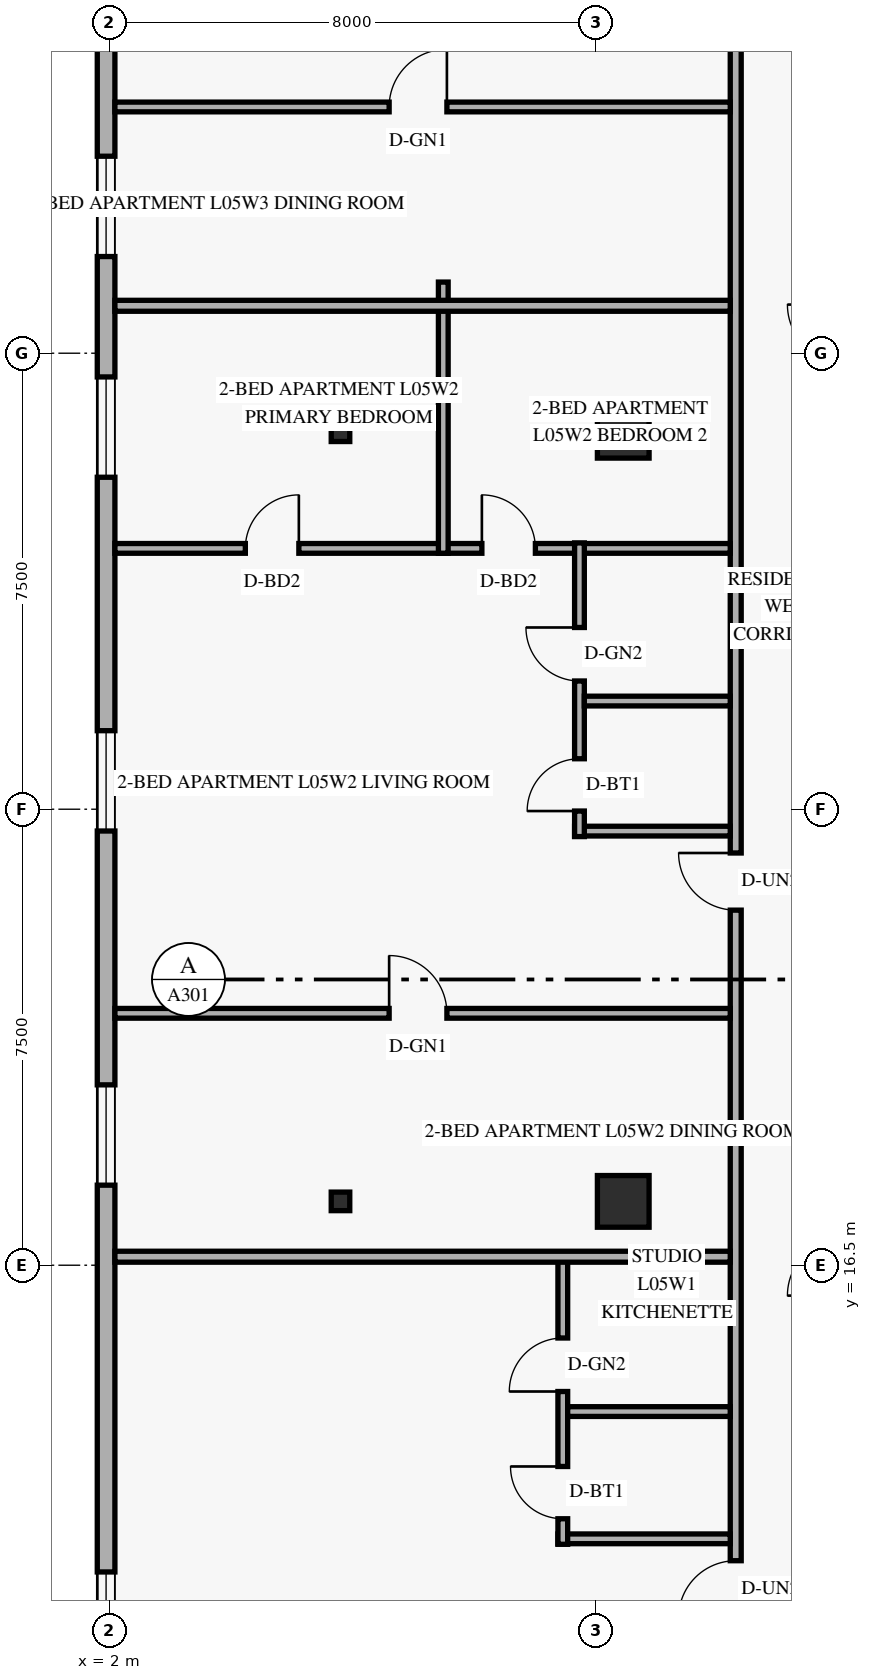
"""IFC4 building model, lengths in metres.
Left out: names, types, materials, properties, quantities, classifications, styles, units other than length and angle.
Written with IfcOpenShell. Run it as: python <this file> out.ifc"""

import sys

from ifc_helpers import new_model, si_unit, direction, frame, frame_2d, origin, origin_2d, place, context, subcontext, project, spatial, rectangle, hollow_rectangle, extrude, element, fill, save


model = new_model("IFC4")
c1 = context("Model", 3, precision=1e-05, world=origin(), true_north=direction((0.0, 1.0)))
c2 = subcontext(c1, "Body", "Model", "MODEL_VIEW")
j1 = project(units=[si_unit("LENGTHUNIT", "METRE"), si_unit("PLANEANGLEUNIT", "RADIAN")], contexts=[c1])
p1 = place(None, origin())
s1 = spatial("IfcSite", under=j1, at=p1, CompositionType="ELEMENT")
p2 = place(p1, origin())
s2 = spatial("IfcBuilding", under=s1, at=p2, CompositionType="ELEMENT")
p3 = place(p2, frame((0.0, 0.0, 24.0)))
s3 = spatial("IfcBuildingStorey", under=s2, at=p3, CompositionType="ELEMENT", Elevation=24.0)
for number, where, z_axis, x_axis in (
    (1, (5.8, 17.55, -0.3), (0.0, 0.0, 1.0), (1.0, 0.0, 0.0)),
    (2, (5.8, 30.2, -0.3), (0.0, 0.0, 1.0), (1.0, 0.0, 0.0)),
):
    element("IfcColumn", number, at=place(p3, frame(where, z_axis=z_axis, x_axis=x_axis)), inside=s3, PredefinedType="COLUMN", context=c2, shape_type="SweptSolid", body=[
        extrude(hollow_rectangle(XDim=0.305, YDim=0.305, WallThickness=0.013, at=origin_2d()), origin(), (0.0, 0.0, 1.0), 3.9),
    ])
for number, where, z_axis, x_axis in (
    (3, (10.45, 17.55, 0.0), (0.0, 0.0, 1.0), (1.0, 0.0, 0.0)),
    (4, (10.45, 30.2, 0.0), (0.0, 0.0, 1.0), (1.0, 0.0, 0.0)),
):
    element("IfcColumn", number, at=place(p3, frame(where, z_axis=z_axis, x_axis=x_axis)), inside=s3, PredefinedType="COLUMN", context=c2, shape_type="SweptSolid", body=[
        extrude(rectangle(XDim=0.85, YDim=0.85, at=origin_2d()), origin(), (0.0, 0.0, 1.0), 3.6),
    ])
p4 = place(p3, frame((1.945, 43.38, 0.0), z_axis=(0.0, 0.0, 1.0), x_axis=(0.0, -1.0, 0.0)))
e5 = element("IfcWall", 5, at=p4, inside=s3, PredefinedType="SOLIDWALL", context=c2, shape_type="SweptSolid", body=[
    extrude(rectangle(XDim=38.76, YDim=0.29, at=frame_2d((19.38, 0.0))), origin(), (0.0, 0.0, 1.0), 3.36),
])
p5 = place(p4, frame((31.925, 0.0, 0.85)))
e6 = element("IfcOpeningElement", 6, at=p5, cuts=e5, PredefinedType="OPENING", context=c2, shape_type="SweptSolid", body=[
    extrude(rectangle(XDim=1.65, YDim=1.6, at=frame_2d((0.825, 0.8))), frame((0.0, 0.155, 0.0), z_axis=(0.0, -1.0, 0.0), x_axis=(1.0, 0.0, 0.0)), (0.0, 0.0, 1.0), 0.31),
])
p6 = place(p4, frame((23.913, 0.0, 0.85)))
e7 = element("IfcOpeningElement", 7, at=p6, cuts=e5, PredefinedType="OPENING", context=c2, shape_type="SweptSolid", body=[
    extrude(rectangle(XDim=1.65, YDim=1.6, at=frame_2d((0.825, 0.8))), frame((0.0, 0.155, 0.0), z_axis=(0.0, -1.0, 0.0), x_axis=(1.0, 0.0, 0.0)), (0.0, 0.0, 1.0), 0.31),
])
p7 = place(p4, frame((18.088, 0.0, 0.85)))
e8 = element("IfcOpeningElement", 8, at=p7, cuts=e5, PredefinedType="OPENING", context=c2, shape_type="SweptSolid", body=[
    extrude(rectangle(XDim=1.65, YDim=1.6, at=frame_2d((0.825, 0.8))), frame((0.0, 0.155, 0.0), z_axis=(0.0, -1.0, 0.0), x_axis=(1.0, 0.0, 0.0)), (0.0, 0.0, 1.0), 0.31),
])
p8 = place(p4, frame((12.27, 0.0, 0.85)))
e9 = element("IfcOpeningElement", 9, at=p8, cuts=e5, PredefinedType="OPENING", context=c2, shape_type="SweptSolid", body=[
    extrude(rectangle(XDim=1.65, YDim=1.6, at=frame_2d((0.825, 0.8))), frame((0.0, 0.155, 0.0), z_axis=(0.0, -1.0, 0.0), x_axis=(1.0, 0.0, 0.0)), (0.0, 0.0, 1.0), 0.31),
])
p9 = place(p4, frame((8.64, 0.0, 0.85)))
e10 = element("IfcOpeningElement", 10, at=p9, cuts=e5, PredefinedType="OPENING", context=c2, shape_type="SweptSolid", body=[
    extrude(rectangle(XDim=1.65, YDim=1.6, at=frame_2d((0.825, 0.8))), frame((0.0, 0.155, 0.0), z_axis=(0.0, -1.0, 0.0), x_axis=(1.0, 0.0, 0.0)), (0.0, 0.0, 1.0), 0.31),
])
p10 = place(p4, frame((3.09, 0.0, 0.85)))
e11 = element("IfcOpeningElement", 11, at=p10, cuts=e5, PredefinedType="OPENING", context=c2, shape_type="SweptSolid", body=[
    extrude(rectangle(XDim=1.65, YDim=1.6, at=frame_2d((0.825, 0.8))), frame((0.0, 0.155, 0.0), z_axis=(0.0, -1.0, 0.0), x_axis=(1.0, 0.0, 0.0)), (0.0, 0.0, 1.0), 0.31),
])
p11 = place(p3, frame((12.3, 1.29, 0.0), z_axis=(0.0, 0.0, 1.0), x_axis=(0.0, 1.0, 0.0)))
e12 = element("IfcWall", 12, at=p11, inside=s3, PredefinedType="STANDARD", context=c2, shape_type="SweptSolid", body=[
    extrude(rectangle(XDim=45.42, YDim=0.18, at=frame_2d((22.71, 0.0))), origin(), (0.0, 0.0, 1.0), 2.649),
])
p12 = place(p11, frame((9.41, 0.0, 0.0)))
e13 = element("IfcOpeningElement", 13, at=p12, cuts=e12, PredefinedType="OPENING", context=c2, shape_type="SweptSolid", body=[
    extrude(rectangle(XDim=0.94, YDim=2.15, at=frame_2d((0.47, 1.075))), frame((0.0, 0.1, 0.0), z_axis=(0.0, -1.0, 0.0), x_axis=(1.0, 0.0, 0.0)), (0.0, 0.0, 1.0), 0.2),
])
p13 = place(p11, frame((21.05, 0.0, 0.0)))
e14 = element("IfcOpeningElement", 14, at=p13, cuts=e12, PredefinedType="OPENING", context=c2, shape_type="SweptSolid", body=[
    extrude(rectangle(XDim=0.94, YDim=2.15, at=frame_2d((0.47, 1.075))), frame((0.0, 0.1, 0.0), z_axis=(0.0, -1.0, 0.0), x_axis=(1.0, 0.0, 0.0)), (0.0, 0.0, 1.0), 0.2),
])
p14 = place(p11, frame((36.491, 0.0, 0.0)))
e15 = element("IfcOpeningElement", 15, at=p14, cuts=e12, PredefinedType="OPENING", context=c2, shape_type="SweptSolid", body=[
    extrude(rectangle(XDim=0.94, YDim=2.15, at=frame_2d((0.47, 1.075))), frame((0.0, 0.1, 0.0), z_axis=(0.0, -1.0, 0.0), x_axis=(1.0, 0.0, 0.0)), (0.0, 0.0, 1.0), 0.2),
])
p15 = place(p3, frame((9.376, 12.0, 0.0), z_axis=(0.0, 0.0, 1.0), x_axis=(1.0, 0.0, 0.0)))
e16 = element("IfcWall", 16, at=p15, inside=s3, PredefinedType="PLUMBINGWALL", context=c2, shape_type="SweptSolid", body=[
    extrude(rectangle(XDim=2.834, YDim=0.16, at=frame_2d((1.417, 0.0))), origin(), (0.0, 0.0, 1.0), 2.649),
])
p16 = place(p3, frame((9.456, 11.91, 0.0), z_axis=(0.0, 0.0, 1.0), x_axis=(0.0, 1.0, 0.0)))
e17 = element("IfcWall", 17, at=p16, inside=s3, PredefinedType="PLUMBINGWALL", context=c2, shape_type="SweptSolid", body=[
    extrude(rectangle(XDim=4.73, YDim=0.16, at=frame_2d((2.365, 0.0))), origin(), (0.0, 0.0, 1.0), 2.932),
])
p17 = place(p16, frame((0.42, 0.0, 0.0)))
e18 = element("IfcOpeningElement", 18, at=p17, cuts=e17, PredefinedType="OPENING", context=c2, shape_type="SweptSolid", body=[
    extrude(rectangle(XDim=0.86, YDim=2.12, at=frame_2d((0.43, 1.06))), frame((0.0, 0.09, 0.0), z_axis=(0.0, -1.0, 0.0), x_axis=(1.0, 0.0, 0.0)), (0.0, 0.0, 1.0), 0.18),
])
p18 = place(p16, frame((2.513, 0.0, 0.0)))
e19 = element("IfcOpeningElement", 19, at=p18, cuts=e17, PredefinedType="OPENING", context=c2, shape_type="SweptSolid", body=[
    extrude(rectangle(XDim=0.88, YDim=2.12, at=frame_2d((0.44, 1.06))), frame((0.0, 0.09, 0.0), z_axis=(0.0, -1.0, 0.0), x_axis=(1.0, 0.0, 0.0)), (0.0, 0.0, 1.0), 0.18),
])
p19 = place(p3, frame((9.536, 14.093, 0.0), z_axis=(0.0, 0.0, 1.0), x_axis=(1.0, 0.0, 0.0)))
e20 = element("IfcWall", 20, at=p19, inside=s3, PredefinedType="PLUMBINGWALL", context=c2, shape_type="SweptSolid", body=[
    extrude(rectangle(XDim=2.674, YDim=0.16, at=frame_2d((1.337, 0.0))), origin(), (0.0, 0.0, 1.0), 2.649),
])
p20 = place(p3, frame((2.09, 16.64, 0.0), z_axis=(0.0, 0.0, 1.0), x_axis=(1.0, 0.0, 0.0)))
e21 = element("IfcWall", 21, at=p20, inside=s3, PredefinedType="PARTITIONING", context=c2, shape_type="SweptSolid", body=[
    extrude(rectangle(XDim=10.12, YDim=0.18, at=frame_2d((5.06, 0.0))), origin(), (0.0, 0.0, 1.0), 2.649),
])
p21 = place(p3, frame((2.09, 28.29, 0.0), z_axis=(0.0, 0.0, 1.0), x_axis=(1.0, 0.0, 0.0)))
e22 = element("IfcWall", 22, at=p21, inside=s3, PredefinedType="PARTITIONING", context=c2, shape_type="SweptSolid", body=[
    extrude(rectangle(XDim=10.12, YDim=0.16, at=frame_2d((5.06, 0.0))), origin(), (0.0, 0.0, 1.0), 2.649),
])
p22 = place(p21, frame((2.145, 0.0, 0.0)))
e23 = element("IfcOpeningElement", 23, at=p22, cuts=e22, PredefinedType="OPENING", context=c2, shape_type="SweptSolid", body=[
    extrude(rectangle(XDim=0.88, YDim=2.14, at=frame_2d((0.44, 1.07))), frame((0.0, 0.09, 0.0), z_axis=(0.0, -1.0, 0.0), x_axis=(1.0, 0.0, 0.0)), (0.0, 0.0, 1.0), 0.18),
])
p23 = place(p21, frame((6.035, 0.0, 0.0)))
e24 = element("IfcOpeningElement", 24, at=p23, cuts=e22, PredefinedType="OPENING", context=c2, shape_type="SweptSolid", body=[
    extrude(rectangle(XDim=0.88, YDim=2.14, at=frame_2d((0.44, 1.07))), frame((0.0, 0.09, 0.0), z_axis=(0.0, -1.0, 0.0), x_axis=(1.0, 0.0, 0.0)), (0.0, 0.0, 1.0), 0.18),
])
p24 = place(p3, frame((9.65, 23.64, 0.0), z_axis=(0.0, 0.0, 1.0), x_axis=(1.0, 0.0, 0.0)))
e25 = element("IfcWall", 25, at=p24, inside=s3, PredefinedType="PLUMBINGWALL", context=c2, shape_type="SweptSolid", body=[
    extrude(rectangle(XDim=2.56, YDim=0.16, at=frame_2d((1.28, 0.0))), origin(), (0.0, 0.0, 1.0), 2.649),
])
p25 = place(p3, frame((9.73, 23.55, 0.0), z_axis=(0.0, 0.0, 1.0), x_axis=(0.0, 1.0, 0.0)))
e26 = element("IfcWall", 26, at=p25, inside=s3, PredefinedType="PLUMBINGWALL", context=c2, shape_type="SweptSolid", body=[
    extrude(rectangle(XDim=4.83, YDim=0.16, at=frame_2d((2.415, 0.0))), origin(), (0.0, 0.0, 1.0), 3.36),
])
p26 = place(p25, frame((0.42, 0.0, 0.0)))
e27 = element("IfcOpeningElement", 27, at=p26, cuts=e26, PredefinedType="OPENING", context=c2, shape_type="SweptSolid", body=[
    extrude(rectangle(XDim=0.86, YDim=2.12, at=frame_2d((0.43, 1.06))), frame((0.0, 0.09, 0.0), z_axis=(0.0, -1.0, 0.0), x_axis=(1.0, 0.0, 0.0)), (0.0, 0.0, 1.0), 0.18),
])
p27 = place(p25, frame((2.559, 0.0, 0.0)))
e28 = element("IfcOpeningElement", 28, at=p27, cuts=e26, PredefinedType="OPENING", context=c2, shape_type="SweptSolid", body=[
    extrude(rectangle(XDim=0.88, YDim=2.12, at=frame_2d((0.44, 1.06))), frame((0.0, 0.09, 0.0), z_axis=(0.0, -1.0, 0.0), x_axis=(1.0, 0.0, 0.0)), (0.0, 0.0, 1.0), 0.18),
])
p28 = place(p3, frame((9.81, 25.779, 0.0), z_axis=(0.0, 0.0, 1.0), x_axis=(1.0, 0.0, 0.0)))
e29 = element("IfcWall", 29, at=p28, inside=s3, PredefinedType="PLUMBINGWALL", context=c2, shape_type="SweptSolid", body=[
    extrude(rectangle(XDim=2.4, YDim=0.16, at=frame_2d((1.2, 0.0))), origin(), (0.0, 0.0, 1.0), 2.649),
])
p29 = place(p3, frame((2.09, 20.643, 0.0), z_axis=(0.0, 0.0, 1.0), x_axis=(1.0, 0.0, 0.0)))
e30 = element("IfcWall", 30, at=p29, inside=s3, PredefinedType="PARTITIONING", context=c2, shape_type="SweptSolid", body=[
    extrude(rectangle(XDim=10.12, YDim=0.16, at=frame_2d((5.06, 0.0))), origin(), (0.0, 0.0, 1.0), 2.649),
])
p30 = place(p29, frame((4.51, 0.0, 0.0)))
e31 = element("IfcOpeningElement", 31, at=p30, cuts=e30, PredefinedType="OPENING", context=c2, shape_type="SweptSolid", body=[
    extrude(rectangle(XDim=0.95, YDim=2.15, at=frame_2d((0.475, 1.075))), frame((0.0, 0.09, 0.0), z_axis=(0.0, -1.0, 0.0), x_axis=(1.0, 0.0, 0.0)), (0.0, 0.0, 1.0), 0.18),
])
p31 = place(p3, frame((7.49, 28.21, 0.0), z_axis=(0.0, 0.0, 1.0), x_axis=(0.0, 1.0, 0.0)))
e32 = element("IfcWall", 32, at=p31, inside=s3, PredefinedType="PARTITIONING", context=c2, shape_type="SweptSolid", body=[
    extrude(rectangle(XDim=4.46, YDim=0.16, at=frame_2d((2.23, 0.0))), origin(), (0.0, 0.0, 1.0), 2.649),
])
p32 = place(p3, frame((2.09, 32.28, 0.0), z_axis=(0.0, 0.0, 1.0), x_axis=(1.0, 0.0, 0.0)))
e33 = element("IfcWall", 33, at=p32, inside=s3, PredefinedType="PARTITIONING", context=c2, shape_type="SweptSolid", body=[
    extrude(rectangle(XDim=10.12, YDim=0.18, at=frame_2d((5.06, 0.0))), origin(), (0.0, 0.0, 1.0), 2.649),
])
p33 = place(p3, frame((2.09, 35.55, 0.0), z_axis=(0.0, 0.0, 1.0), x_axis=(1.0, 0.0, 0.0)))
e34 = element("IfcWall", 34, at=p33, inside=s3, PredefinedType="PARTITIONING", context=c2, shape_type="SweptSolid", body=[
    extrude(rectangle(XDim=10.12, YDim=0.16, at=frame_2d((5.06, 0.0))), origin(), (0.0, 0.0, 1.0), 2.649),
])
p34 = place(p33, frame((4.51, 0.0, 0.0)))
e35 = element("IfcOpeningElement", 35, at=p34, cuts=e34, PredefinedType="OPENING", context=c2, shape_type="SweptSolid", body=[
    extrude(rectangle(XDim=0.95, YDim=2.15, at=frame_2d((0.475, 1.075))), frame((0.0, 0.09, 0.0), z_axis=(0.0, -1.0, 0.0), x_axis=(1.0, 0.0, 0.0)), (0.0, 0.0, 1.0), 0.18),
])
p35 = place(p5, origin())
e36 = element("IfcWindow", 36, at=p35, inside=s3, PartitioningType="SINGLE_PANEL", PredefinedType="WINDOW", context=c2, shape_type="SweptSolid", body=[
    extrude(rectangle(XDim=1.65, YDim=1.6, at=frame_2d((0.825, 0.8))), frame((0.0, 0.03, 0.0), z_axis=(0.0, -1.0, 0.0), x_axis=(1.0, 0.0, 0.0)), (0.0, 0.0, 1.0), 0.06),
])
fill(e6, e36)
p36 = place(p6, origin())
e37 = element("IfcWindow", 37, at=p36, inside=s3, PartitioningType="SINGLE_PANEL", PredefinedType="WINDOW", context=c2, shape_type="SweptSolid", body=[
    extrude(rectangle(XDim=1.65, YDim=1.6, at=frame_2d((0.825, 0.8))), frame((0.0, 0.03, 0.0), z_axis=(0.0, -1.0, 0.0), x_axis=(1.0, 0.0, 0.0)), (0.0, 0.0, 1.0), 0.06),
])
fill(e7, e37)
p37 = place(p7, origin())
e38 = element("IfcWindow", 38, at=p37, inside=s3, PartitioningType="SINGLE_PANEL", PredefinedType="WINDOW", context=c2, shape_type="SweptSolid", body=[
    extrude(rectangle(XDim=1.65, YDim=1.6, at=frame_2d((0.825, 0.8))), frame((0.0, 0.03, 0.0), z_axis=(0.0, -1.0, 0.0), x_axis=(1.0, 0.0, 0.0)), (0.0, 0.0, 1.0), 0.06),
])
fill(e8, e38)
p38 = place(p8, origin())
e39 = element("IfcWindow", 39, at=p38, inside=s3, PartitioningType="SINGLE_PANEL", PredefinedType="WINDOW", context=c2, shape_type="SweptSolid", body=[
    extrude(rectangle(XDim=1.65, YDim=1.6, at=frame_2d((0.825, 0.8))), frame((0.0, 0.03, 0.0), z_axis=(0.0, -1.0, 0.0), x_axis=(1.0, 0.0, 0.0)), (0.0, 0.0, 1.0), 0.06),
])
fill(e9, e39)
p39 = place(p9, origin())
e40 = element("IfcWindow", 40, at=p39, inside=s3, PartitioningType="SINGLE_PANEL", PredefinedType="WINDOW", context=c2, shape_type="SweptSolid", body=[
    extrude(rectangle(XDim=1.65, YDim=1.6, at=frame_2d((0.825, 0.8))), frame((0.0, 0.03, 0.0), z_axis=(0.0, -1.0, 0.0), x_axis=(1.0, 0.0, 0.0)), (0.0, 0.0, 1.0), 0.06),
])
fill(e10, e40)
p40 = place(p12, origin())
e41 = element("IfcDoor", 41, at=p40, inside=s3, OperationType="SINGLE_SWING_LEFT", PredefinedType="DOOR", context=c2, shape_type="SweptSolid", body=[
    extrude(rectangle(XDim=0.94, YDim=2.15, at=frame_2d((0.47, 1.075))), frame((0.0, 0.025, 0.0), z_axis=(0.0, -1.0, 0.0), x_axis=(1.0, 0.0, 0.0)), (0.0, 0.0, 1.0), 0.05),
])
fill(e13, e41)
p41 = place(p17, origin())
e42 = element("IfcDoor", 42, at=p41, inside=s3, OperationType="SINGLE_SWING_RIGHT", PredefinedType="DOOR", context=c2, shape_type="SweptSolid", body=[
    extrude(rectangle(XDim=0.86, YDim=2.12, at=frame_2d((0.43, 1.06))), frame((0.0, 0.025, 0.0), z_axis=(0.0, -1.0, 0.0), x_axis=(1.0, 0.0, 0.0)), (0.0, 0.0, 1.0), 0.05),
])
fill(e18, e42)
p42 = place(p18, origin())
e43 = element("IfcDoor", 43, at=p42, inside=s3, OperationType="SINGLE_SWING_LEFT", PredefinedType="DOOR", context=c2, shape_type="SweptSolid", body=[
    extrude(rectangle(XDim=0.88, YDim=2.12, at=frame_2d((0.44, 1.06))), frame((0.0, 0.025, 0.0), z_axis=(0.0, -1.0, 0.0), x_axis=(1.0, 0.0, 0.0)), (0.0, 0.0, 1.0), 0.05),
])
fill(e19, e43)
p43 = place(p30, origin())
e44 = element("IfcDoor", 44, at=p43, inside=s3, OperationType="SINGLE_SWING_LEFT", PredefinedType="DOOR", context=c2, shape_type="SweptSolid", body=[
    extrude(rectangle(XDim=0.95, YDim=2.15, at=frame_2d((0.475, 1.075))), frame((0.0, 0.025, 0.0), z_axis=(0.0, -1.0, 0.0), x_axis=(1.0, 0.0, 0.0)), (0.0, 0.0, 1.0), 0.05),
])
fill(e31, e44)
p44 = place(p13, origin())
e45 = element("IfcDoor", 45, at=p44, inside=s3, OperationType="SINGLE_SWING_RIGHT", PredefinedType="DOOR", context=c2, shape_type="SweptSolid", body=[
    extrude(rectangle(XDim=0.94, YDim=2.15, at=frame_2d((0.47, 1.075))), frame((0.0, 0.025, 0.0), z_axis=(0.0, -1.0, 0.0), x_axis=(1.0, 0.0, 0.0)), (0.0, 0.0, 1.0), 0.05),
])
fill(e14, e45)
p45 = place(p26, origin())
e46 = element("IfcDoor", 46, at=p45, inside=s3, OperationType="SINGLE_SWING_LEFT", PredefinedType="DOOR", context=c2, shape_type="SweptSolid", body=[
    extrude(rectangle(XDim=0.86, YDim=2.12, at=frame_2d((0.43, 1.06))), frame((0.0, 0.025, 0.0), z_axis=(0.0, -1.0, 0.0), x_axis=(1.0, 0.0, 0.0)), (0.0, 0.0, 1.0), 0.05),
])
fill(e27, e46)
p46 = place(p27, origin())
e47 = element("IfcDoor", 47, at=p46, inside=s3, OperationType="SINGLE_SWING_RIGHT", PredefinedType="DOOR", context=c2, shape_type="SweptSolid", body=[
    extrude(rectangle(XDim=0.88, YDim=2.12, at=frame_2d((0.44, 1.06))), frame((0.0, 0.025, 0.0), z_axis=(0.0, -1.0, 0.0), x_axis=(1.0, 0.0, 0.0)), (0.0, 0.0, 1.0), 0.05),
])
fill(e28, e47)
p47 = place(p22, origin())
e48 = element("IfcDoor", 48, at=p47, inside=s3, OperationType="SINGLE_SWING_RIGHT", PredefinedType="DOOR", context=c2, shape_type="SweptSolid", body=[
    extrude(rectangle(XDim=0.88, YDim=2.14, at=frame_2d((0.44, 1.07))), frame((0.0, 0.025, 0.0), z_axis=(0.0, -1.0, 0.0), x_axis=(1.0, 0.0, 0.0)), (0.0, 0.0, 1.0), 0.05),
])
fill(e23, e48)
p48 = place(p23, origin())
e49 = element("IfcDoor", 49, at=p48, inside=s3, OperationType="SINGLE_SWING_LEFT", PredefinedType="DOOR", context=c2, shape_type="SweptSolid", body=[
    extrude(rectangle(XDim=0.88, YDim=2.14, at=frame_2d((0.44, 1.07))), frame((0.0, 0.025, 0.0), z_axis=(0.0, -1.0, 0.0), x_axis=(1.0, 0.0, 0.0)), (0.0, 0.0, 1.0), 0.05),
])
fill(e24, e49)
p49 = place(p34, origin())
e50 = element("IfcDoor", 50, at=p49, inside=s3, OperationType="SINGLE_SWING_RIGHT", PredefinedType="DOOR", context=c2, shape_type="SweptSolid", body=[
    extrude(rectangle(XDim=0.95, YDim=2.15, at=frame_2d((0.475, 1.075))), frame((0.0, 0.025, 0.0), z_axis=(0.0, -1.0, 0.0), x_axis=(1.0, 0.0, 0.0)), (0.0, 0.0, 1.0), 0.05),
])
fill(e35, e50)
save(model, sys.argv[1])
